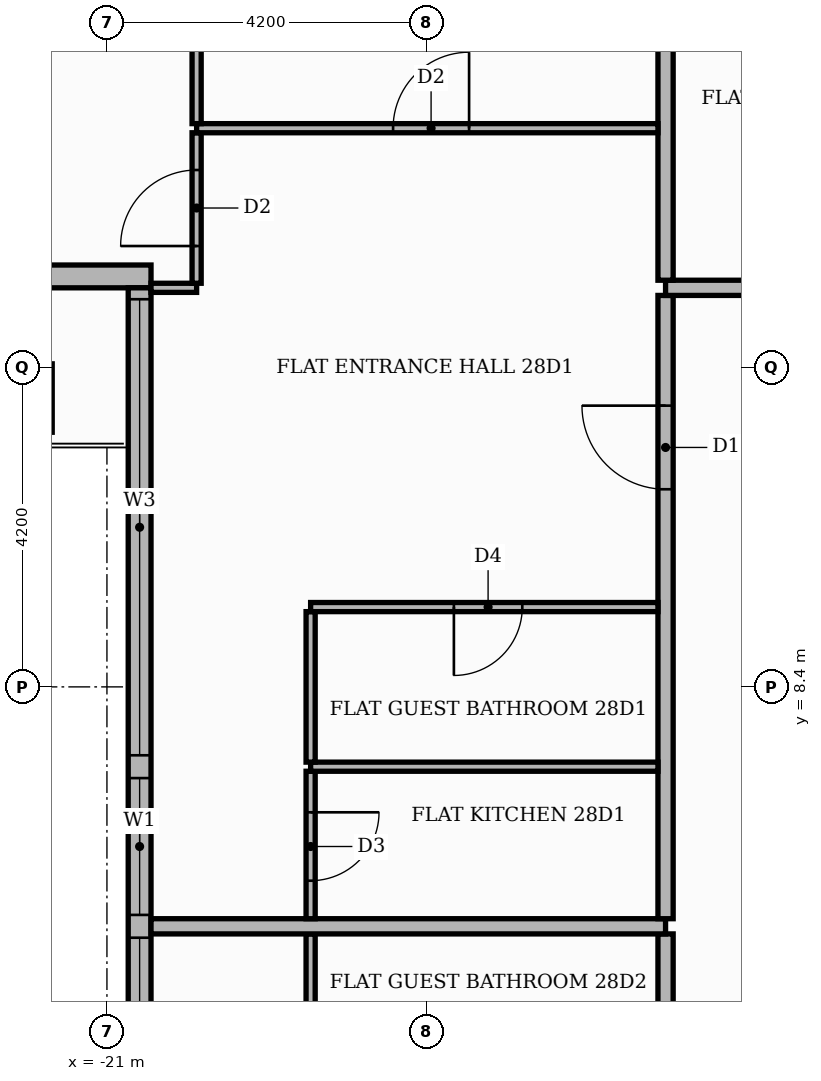
"""IFC4 building model, lengths in metres.
Left out: names, types, materials, properties, quantities, classifications, styles, units other than length and angle.
Written with IfcOpenShell. Run it as: python <this file> out.ifc"""

import sys

from ifc_helpers import new_model, si_unit, direction, frame, frame_2d, origin, place, context, subcontext, project, spatial, rectangle, extrude, element, fill, save


model = new_model("IFC4")
c1 = context("Model", 3, precision=1e-05, world=origin(), true_north=direction((0.0, 1.0)))
c2 = subcontext(c1, "Body", "Model", "MODEL_VIEW")
j1 = project(units=[si_unit("LENGTHUNIT", "METRE"), si_unit("PLANEANGLEUNIT", "RADIAN")], contexts=[c1])
p1 = place(None, origin())
s1 = spatial("IfcSite", under=j1, at=p1, CompositionType="ELEMENT")
p2 = place(p1, origin())
s2 = spatial("IfcBuilding", under=s1, at=p2, CompositionType="ELEMENT")
p3 = place(p2, frame((0.0, 0.0, 118.2)))
s3 = spatial("IfcBuildingStorey", under=s2, at=p3, CompositionType="ELEMENT", Elevation=118.2)
p4 = place(p3, frame((-25.42, 13.8, 0.0), z_axis=(0.0, 0.0, 1.0), x_axis=(1.0, 0.0, 0.0)))
e1 = element("IfcWall", 1, at=p4, inside=s3, PredefinedType="STANDARD", context=c2, shape_type="SweptSolid", body=[
    extrude(rectangle(XDim=5.0, YDim=0.3, at=frame_2d((2.5, 0.0))), origin(), (0.0, 0.0, 1.0), 3.48),
])
p5 = place(p4, frame((1.42, 0.0, 0.0)))
e2 = element("IfcOpeningElement", 2, at=p5, cuts=e1, PredefinedType="OPENING", context=c2, shape_type="SweptSolid", body=[
    extrude(rectangle(XDim=1.8, YDim=2.4, at=frame_2d((0.9, 1.2))), frame((0.0, 0.16, 0.0), z_axis=(0.0, -1.0, 0.0), x_axis=(1.0, 0.0, 0.0)), (0.0, 0.0, 1.0), 0.32),
])
p6 = place(p3, frame((-20.57, 13.65, 0.0), z_axis=(0.0, 0.0, 1.0), x_axis=(0.0, -1.0, 0.0)))
e3 = element("IfcWall", 3, at=p6, inside=s3, PredefinedType="STANDARD", context=c2, shape_type="SweptSolid", body=[
    extrude(rectangle(XDim=27.6, YDim=0.3, at=frame_2d((13.8, 0.0))), origin(), (0.0, 0.0, 1.0), 3.48),
])
p7 = place(p6, frame((0.15, 0.0, 0.9)))
e4 = element("IfcOpeningElement", 4, at=p7, cuts=e3, PredefinedType="OPENING", context=c2, shape_type="SweptSolid", body=[
    extrude(rectangle(XDim=6.0, YDim=2.1, at=frame_2d((3.0, 1.05))), frame((0.0, 0.16, 0.0), z_axis=(0.0, -1.0, 0.0), x_axis=(1.0, 0.0, 0.0)), (0.0, 0.0, 1.0), 0.32),
])
p8 = place(p6, frame((6.45, 0.0, 0.9)))
e5 = element("IfcOpeningElement", 5, at=p8, cuts=e3, PredefinedType="OPENING", context=c2, shape_type="SweptSolid", body=[
    extrude(rectangle(XDim=1.8, YDim=2.1, at=frame_2d((0.9, 1.05))), frame((0.0, 0.16, 0.0), z_axis=(0.0, -1.0, 0.0), x_axis=(1.0, 0.0, 0.0)), (0.0, 0.0, 1.0), 0.32),
])
p9 = place(p6, frame((8.55, 0.0, 0.9)))
e6 = element("IfcOpeningElement", 6, at=p9, cuts=e3, PredefinedType="OPENING", context=c2, shape_type="SweptSolid", body=[
    extrude(rectangle(XDim=6.0, YDim=2.1, at=frame_2d((3.0, 1.05))), frame((0.0, 0.16, 0.0), z_axis=(0.0, -1.0, 0.0), x_axis=(1.0, 0.0, 0.0)), (0.0, 0.0, 1.0), 0.32),
])
p10 = place(p6, frame((14.85, 0.0, 0.9)))
e7 = element("IfcOpeningElement", 7, at=p10, cuts=e3, PredefinedType="OPENING", context=c2, shape_type="SweptSolid", body=[
    extrude(rectangle(XDim=6.0, YDim=2.1, at=frame_2d((3.0, 1.05))), frame((0.0, 0.16, 0.0), z_axis=(0.0, -1.0, 0.0), x_axis=(1.0, 0.0, 0.0)), (0.0, 0.0, 1.0), 0.32),
])
p11 = place(p6, frame((21.15, 0.0, 0.9)))
e8 = element("IfcOpeningElement", 8, at=p11, cuts=e3, PredefinedType="OPENING", context=c2, shape_type="SweptSolid", body=[
    extrude(rectangle(XDim=6.0, YDim=2.1, at=frame_2d((3.0, 1.05))), frame((0.0, 0.16, 0.0), z_axis=(0.0, -1.0, 0.0), x_axis=(1.0, 0.0, 0.0)), (0.0, 0.0, 1.0), 0.32),
])
p12 = place(p3, frame((-13.65, -13.55, 0.0), z_axis=(0.0, 0.0, 1.0), x_axis=(0.0, 1.0, 0.0)))
e9 = element("IfcWall", 9, at=p12, inside=s3, PredefinedType="PARTITIONING", context=c2, shape_type="SweptSolid", body=[
    extrude(rectangle(XDim=18.7, YDim=0.2, at=frame_2d((9.35, 0.0))), origin(), (0.0, 0.0, 1.0), 3.48),
])
p13 = place(p12, frame((14.05, 0.0, 0.0)))
e10 = element("IfcOpeningElement", 10, at=p13, cuts=e9, PredefinedType="OPENING", context=c2, shape_type="SweptSolid", body=[
    extrude(rectangle(XDim=1.1, YDim=2.4, at=frame_2d((0.55, 1.2))), frame((0.0, 0.11, 0.0), z_axis=(0.0, -1.0, 0.0), x_axis=(1.0, 0.0, 0.0)), (0.0, 0.0, 1.0), 0.22),
])
p14 = place(p3, frame((-18.32, 3.21, 0.0), z_axis=(0.0, 0.0, 1.0), x_axis=(0.0, 1.0, 0.0)))
e11 = element("IfcWall", 11, at=p14, inside=s3, PredefinedType="PARTITIONING", context=c2, shape_type="SweptSolid", body=[
    extrude(rectangle(XDim=1.94, YDim=0.12, at=frame_2d((0.97, 0.0))), origin(), (0.0, 0.0, 1.0), 3.48),
])
p15 = place(p3, frame((-20.42, 5.25, 0.0), z_axis=(0.0, 0.0, 1.0), x_axis=(1.0, 0.0, 0.0)))
e12 = element("IfcWall", 12, at=p15, inside=s3, PredefinedType="PARTITIONING", context=c2, shape_type="SweptSolid", body=[
    extrude(rectangle(XDim=6.77, YDim=0.2, at=frame_2d((3.385, 0.0))), origin(), (0.0, 0.0, 1.0), 3.48),
])
p16 = place(p3, frame((-18.32, 5.35, 0.0), z_axis=(0.0, 0.0, 1.0), x_axis=(0.0, 1.0, 0.0)))
e13 = element("IfcWall", 13, at=p16, inside=s3, PredefinedType="PARTITIONING", context=c2, shape_type="SweptSolid", body=[
    extrude(rectangle(XDim=1.94, YDim=0.12, at=frame_2d((0.97, 0.0))), origin(), (0.0, 0.0, 1.0), 3.48),
])
p17 = place(p16, frame((0.5, 0.0, 0.0)))
e14 = element("IfcOpeningElement", 14, at=p17, cuts=e13, PredefinedType="OPENING", context=c2, shape_type="SweptSolid", body=[
    extrude(rectangle(XDim=0.9, YDim=2.1, at=frame_2d((0.45, 1.05))), frame((0.0, 0.07, 0.0), z_axis=(0.0, -1.0, 0.0), x_axis=(1.0, 0.0, 0.0)), (0.0, 0.0, 1.0), 0.14),
])
p18 = place(p3, frame((-13.65, 5.35, 0.0), z_axis=(0.0, 0.0, 1.0), x_axis=(0.0, 1.0, 0.0)))
e15 = element("IfcWall", 15, at=p18, inside=s3, PredefinedType="PARTITIONING", context=c2, shape_type="SweptSolid", body=[
    extrude(rectangle(XDim=8.2, YDim=0.2, at=frame_2d((4.1, 0.0))), origin(), (0.0, 0.0, 1.0), 3.48),
])
p19 = place(p18, frame((5.65, 0.0, 0.0)))
e16 = element("IfcOpeningElement", 16, at=p19, cuts=e15, PredefinedType="OPENING", context=c2, shape_type="SweptSolid", body=[
    extrude(rectangle(XDim=1.1, YDim=2.4, at=frame_2d((0.55, 1.2))), frame((0.0, 0.11, 0.0), z_axis=(0.0, -1.0, 0.0), x_axis=(1.0, 0.0, 0.0)), (0.0, 0.0, 1.0), 0.22),
])
p20 = place(p3, frame((-18.32, 7.35, 0.0), z_axis=(0.0, 0.0, 1.0), x_axis=(1.0, 0.0, 0.0)))
e17 = element("IfcWall", 17, at=p20, inside=s3, PredefinedType="PARTITIONING", context=c2, shape_type="SweptSolid", body=[
    extrude(rectangle(XDim=4.57, YDim=0.12, at=frame_2d((2.285, 0.0))), origin(), (0.0, 0.0, 1.0), 3.48),
])
p21 = place(p3, frame((-18.32, 7.41, 0.0), z_axis=(0.0, 0.0, 1.0), x_axis=(0.0, 1.0, 0.0)))
e18 = element("IfcWall", 18, at=p21, inside=s3, PredefinedType="PARTITIONING", context=c2, shape_type="SweptSolid", body=[
    extrude(rectangle(XDim=1.98, YDim=0.12, at=frame_2d((0.99, 0.0))), origin(), (0.0, 0.0, 1.0), 3.48),
])
p22 = place(p3, frame((-18.32, 9.45, 0.0), z_axis=(0.0, 0.0, 1.0), x_axis=(1.0, 0.0, 0.0)))
e19 = element("IfcWall", 19, at=p22, inside=s3, PredefinedType="PARTITIONING", context=c2, shape_type="SweptSolid", body=[
    extrude(rectangle(XDim=4.57, YDim=0.12, at=frame_2d((2.285, 0.0))), origin(), (0.0, 0.0, 1.0), 3.48),
])
p23 = place(p22, frame((1.885, 0.0, 0.0)))
e20 = element("IfcOpeningElement", 20, at=p23, cuts=e19, PredefinedType="OPENING", context=c2, shape_type="SweptSolid", body=[
    extrude(rectangle(XDim=0.9, YDim=2.1, at=frame_2d((0.45, 1.05))), frame((0.0, 0.07, 0.0), z_axis=(0.0, -1.0, 0.0), x_axis=(1.0, 0.0, 0.0)), (0.0, 0.0, 1.0), 0.14),
])
p24 = place(p3, frame((-20.42, 13.65, 0.0), z_axis=(0.0, 0.0, 1.0), x_axis=(1.0, 0.0, 0.0)))
e21 = element("IfcWall", 21, at=p24, inside=s3, PredefinedType="PARTITIONING", context=c2, shape_type="SweptSolid", body=[
    extrude(rectangle(XDim=0.6, YDim=0.12, at=frame_2d((0.3, 0.0))), origin(), (0.0, 0.0, 1.0), 3.48),
])
p25 = place(p3, frame((-13.65, 13.65, 0.0), z_axis=(0.0, 0.0, 1.0), x_axis=(1.0, 0.0, 0.0)))
e22 = element("IfcWall", 22, at=p25, inside=s3, PredefinedType="PARTITIONING", context=c2, shape_type="SweptSolid", body=[
    extrude(rectangle(XDim=39.07, YDim=0.2, at=frame_2d((19.535, 0.0))), origin(), (0.0, 0.0, 1.0), 3.48),
])
p26 = place(p25, frame((24.65, 0.0, 0.0)))
e23 = element("IfcOpeningElement", 23, at=p26, cuts=e22, PredefinedType="OPENING", context=c2, shape_type="SweptSolid", body=[
    extrude(rectangle(XDim=1.1, YDim=2.4, at=frame_2d((0.55, 1.2))), frame((0.0, 0.11, 0.0), z_axis=(0.0, -1.0, 0.0), x_axis=(1.0, 0.0, 0.0)), (0.0, 0.0, 1.0), 0.22),
])
p27 = place(p25, frame((14.15, 0.0, 0.0)))
e24 = element("IfcOpeningElement", 24, at=p27, cuts=e22, PredefinedType="OPENING", context=c2, shape_type="SweptSolid", body=[
    extrude(rectangle(XDim=1.1, YDim=2.4, at=frame_2d((0.55, 1.2))), frame((0.0, 0.11, 0.0), z_axis=(0.0, -1.0, 0.0), x_axis=(1.0, 0.0, 0.0)), (0.0, 0.0, 1.0), 0.22),
])
p28 = place(p3, frame((-19.82, 13.71, 0.0), z_axis=(0.0, 0.0, 1.0), x_axis=(0.0, 1.0, 0.0)))
e25 = element("IfcWall", 25, at=p28, inside=s3, PredefinedType="PARTITIONING", context=c2, shape_type="SweptSolid", body=[
    extrude(rectangle(XDim=1.98, YDim=0.12, at=frame_2d((0.99, 0.0))), origin(), (0.0, 0.0, 1.0), 3.48),
])
p29 = place(p28, frame((0.49, 0.0, 0.0)))
e26 = element("IfcOpeningElement", 26, at=p29, cuts=e25, PredefinedType="OPENING", context=c2, shape_type="SweptSolid", body=[
    extrude(rectangle(XDim=1.0, YDim=2.1, at=frame_2d((0.5, 1.05))), frame((0.0, 0.07, 0.0), z_axis=(0.0, -1.0, 0.0), x_axis=(1.0, 0.0, 0.0)), (0.0, 0.0, 1.0), 0.14),
])
p30 = place(p3, frame((-13.65, 13.75, 0.0), z_axis=(0.0, 0.0, 1.0), x_axis=(0.0, 1.0, 0.0)))
e27 = element("IfcWall", 27, at=p30, inside=s3, PredefinedType="PARTITIONING", context=c2, shape_type="SweptSolid", body=[
    extrude(rectangle(XDim=11.67, YDim=0.2, at=frame_2d((5.835, 0.0))), origin(), (0.0, 0.0, 1.0), 3.48),
])
p31 = place(p3, frame((-19.82, 15.75, 0.0), z_axis=(0.0, 0.0, 1.0), x_axis=(1.0, 0.0, 0.0)))
e28 = element("IfcWall", 28, at=p31, inside=s3, PredefinedType="PARTITIONING", context=c2, shape_type="SweptSolid", body=[
    extrude(rectangle(XDim=6.07, YDim=0.12, at=frame_2d((3.035, 0.0))), origin(), (0.0, 0.0, 1.0), 3.48),
])
p32 = place(p31, frame((2.585, 0.0, 0.0)))
e29 = element("IfcOpeningElement", 29, at=p32, cuts=e28, PredefinedType="OPENING", context=c2, shape_type="SweptSolid", body=[
    extrude(rectangle(XDim=1.0, YDim=2.1, at=frame_2d((0.5, 1.05))), frame((0.0, 0.07, 0.0), z_axis=(0.0, -1.0, 0.0), x_axis=(1.0, 0.0, 0.0)), (0.0, 0.0, 1.0), 0.14),
])
p33 = place(p3, frame((-19.82, 15.81, 0.0), z_axis=(0.0, 0.0, 1.0), x_axis=(0.0, 1.0, 0.0)))
e30 = element("IfcWall", 30, at=p33, inside=s3, PredefinedType="PARTITIONING", context=c2, shape_type="SweptSolid", body=[
    extrude(rectangle(XDim=1.59, YDim=0.12, at=frame_2d((0.795, 0.0))), origin(), (0.0, 0.0, 1.0), 3.48),
])
p34 = place(p7, origin())
e31 = element("IfcWindow", 31, at=p34, inside=s3, PartitioningType="SINGLE_PANEL", PredefinedType="WINDOW", context=c2, shape_type="SweptSolid", body=[
    extrude(rectangle(XDim=6.0, YDim=2.1, at=frame_2d((3.0, 1.05))), frame((0.0, 0.03, 0.0), z_axis=(0.0, -1.0, 0.0), x_axis=(1.0, 0.0, 0.0)), (0.0, 0.0, 1.0), 0.06),
])
fill(e4, e31)
p35 = place(p8, origin())
e32 = element("IfcWindow", 32, at=p35, inside=s3, PartitioningType="SINGLE_PANEL", PredefinedType="WINDOW", context=c2, shape_type="SweptSolid", body=[
    extrude(rectangle(XDim=1.8, YDim=2.1, at=frame_2d((0.9, 1.05))), frame((0.0, 0.03, 0.0), z_axis=(0.0, -1.0, 0.0), x_axis=(1.0, 0.0, 0.0)), (0.0, 0.0, 1.0), 0.06),
])
fill(e5, e32)
p36 = place(p9, origin())
e33 = element("IfcWindow", 33, at=p36, inside=s3, PartitioningType="SINGLE_PANEL", PredefinedType="WINDOW", context=c2, shape_type="SweptSolid", body=[
    extrude(rectangle(XDim=6.0, YDim=2.1, at=frame_2d((3.0, 1.05))), frame((0.0, 0.03, 0.0), z_axis=(0.0, -1.0, 0.0), x_axis=(1.0, 0.0, 0.0)), (0.0, 0.0, 1.0), 0.06),
])
fill(e6, e33)
p37 = place(p19, origin())
e34 = element("IfcDoor", 34, at=p37, inside=s3, OperationType="SINGLE_SWING_RIGHT", PredefinedType="DOOR", context=c2, shape_type="SweptSolid", body=[
    extrude(rectangle(XDim=1.1, YDim=2.4, at=frame_2d((0.55, 1.2))), frame((0.0, 0.025, 0.0), z_axis=(0.0, -1.0, 0.0), x_axis=(1.0, 0.0, 0.0)), (0.0, 0.0, 1.0), 0.05),
])
fill(e16, e34)
p38 = place(p32, origin())
e35 = element("IfcDoor", 35, at=p38, inside=s3, OperationType="SINGLE_SWING_RIGHT", PredefinedType="DOOR", context=c2, shape_type="SweptSolid", body=[
    extrude(rectangle(XDim=1.0, YDim=2.1, at=frame_2d((0.5, 1.05))), frame((0.0, 0.025, 0.0), z_axis=(0.0, -1.0, 0.0), x_axis=(1.0, 0.0, 0.0)), (0.0, 0.0, 1.0), 0.05),
])
fill(e29, e35)
p39 = place(p23, frame((0.9, 0.0, 0.0), z_axis=(0.0, 0.0, 1.0), x_axis=(-1.0, 0.0, 0.0)))
e36 = element("IfcDoor", 36, at=p39, inside=s3, OperationType="SINGLE_SWING_LEFT", PredefinedType="DOOR", context=c2, shape_type="SweptSolid", body=[
    extrude(rectangle(XDim=0.9, YDim=2.1, at=frame_2d((0.45, 1.05))), frame((0.0, 0.025, 0.0), z_axis=(0.0, -1.0, 0.0), x_axis=(1.0, 0.0, 0.0)), (0.0, 0.0, 1.0), 0.05),
])
fill(e20, e36)
p40 = place(p17, frame((0.9, 0.0, 0.0), z_axis=(0.0, 0.0, 1.0), x_axis=(-1.0, 0.0, 0.0)))
e37 = element("IfcDoor", 37, at=p40, inside=s3, OperationType="SINGLE_SWING_RIGHT", PredefinedType="DOOR", context=c2, shape_type="SweptSolid", body=[
    extrude(rectangle(XDim=0.9, YDim=2.1, at=frame_2d((0.45, 1.05))), frame((0.0, 0.025, 0.0), z_axis=(0.0, -1.0, 0.0), x_axis=(1.0, 0.0, 0.0)), (0.0, 0.0, 1.0), 0.05),
])
fill(e14, e37)
p41 = place(p29, origin())
e38 = element("IfcDoor", 38, at=p41, inside=s3, OperationType="SINGLE_SWING_LEFT", PredefinedType="DOOR", context=c2, shape_type="SweptSolid", body=[
    extrude(rectangle(XDim=1.0, YDim=2.1, at=frame_2d((0.5, 1.05))), frame((0.0, 0.025, 0.0), z_axis=(0.0, -1.0, 0.0), x_axis=(1.0, 0.0, 0.0)), (0.0, 0.0, 1.0), 0.05),
])
fill(e26, e38)
save(model, sys.argv[1])
